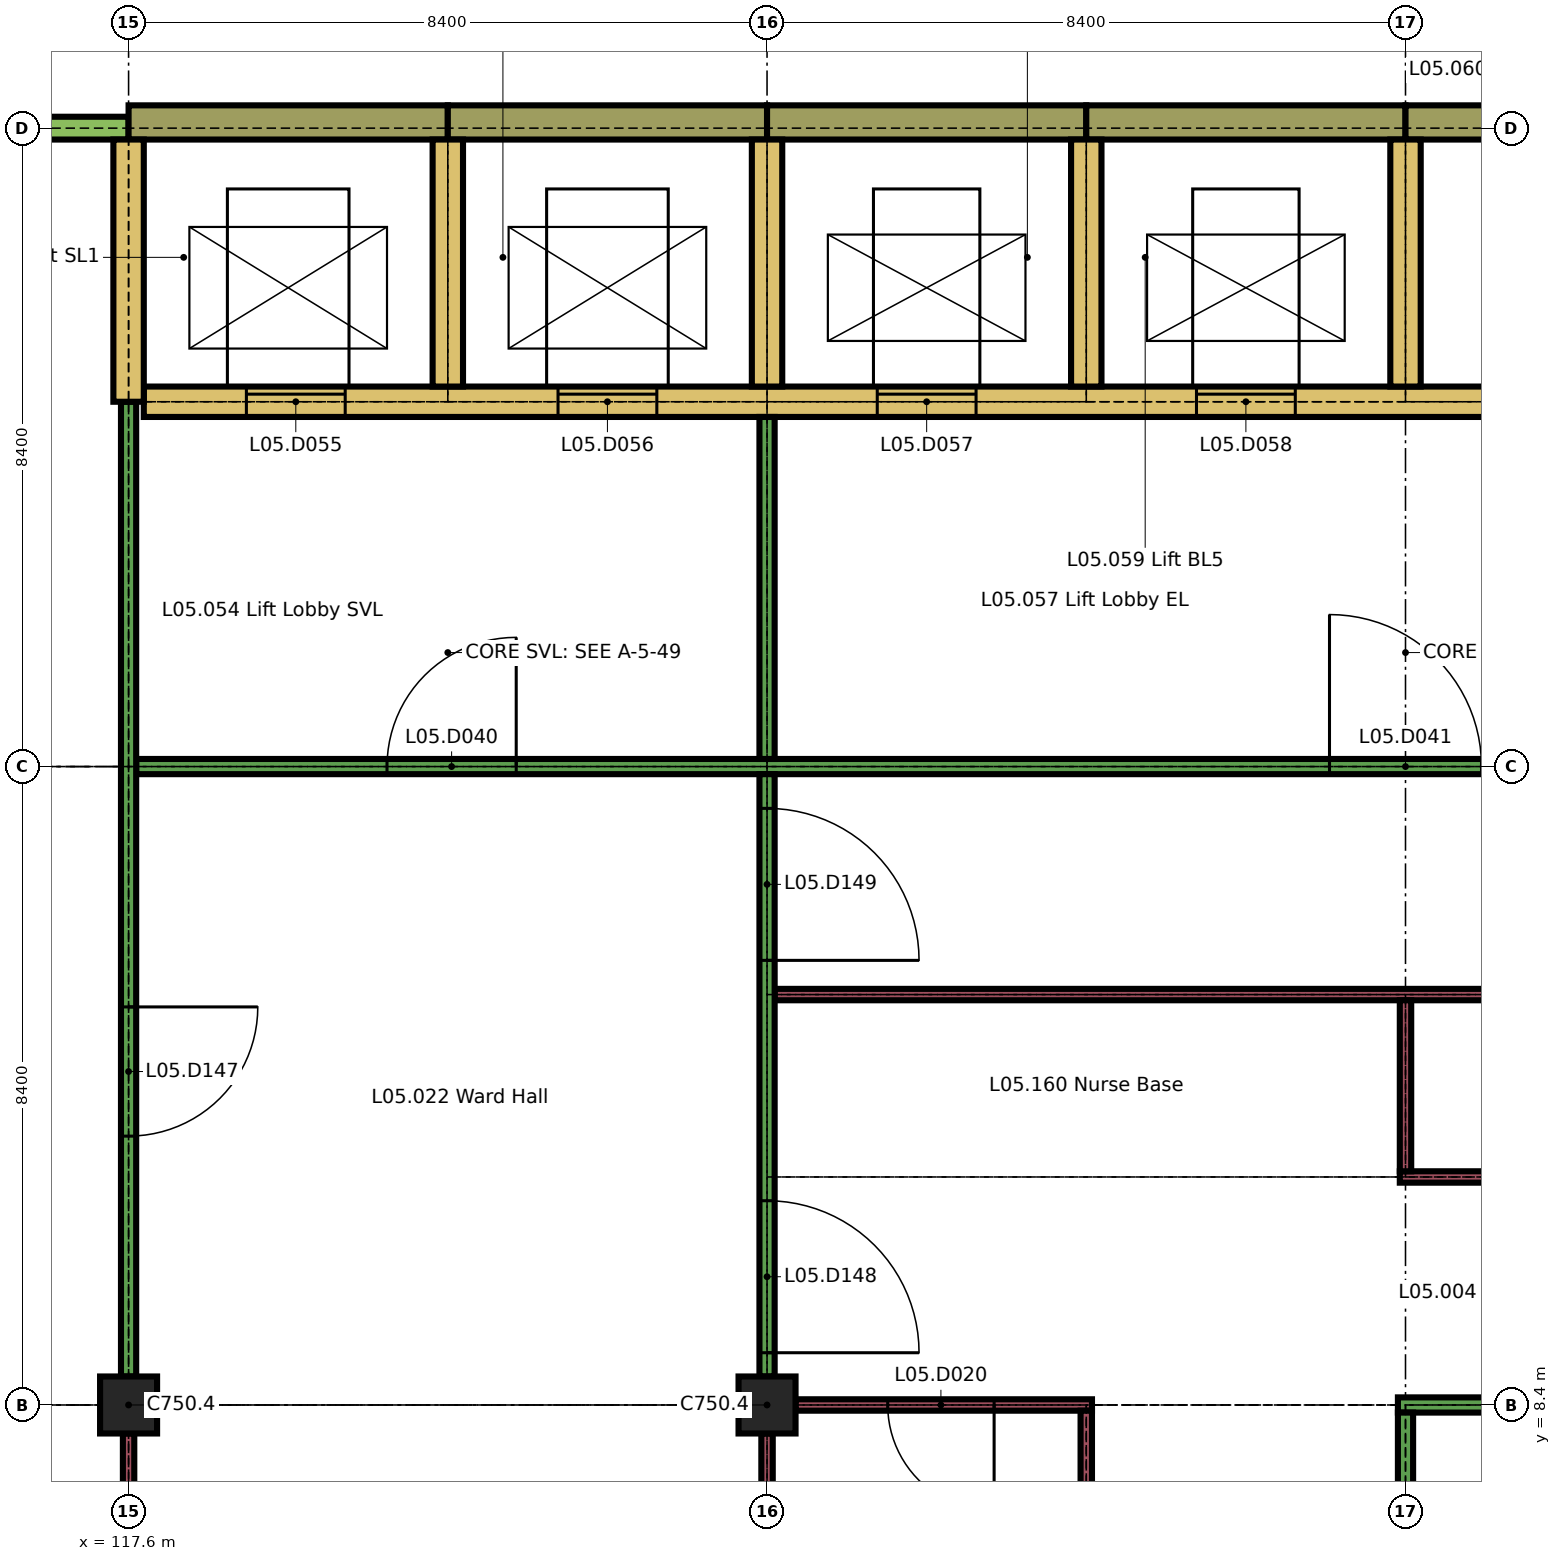
"""IFC4 building model, lengths in metres.
Left out: names, types, materials, properties, quantities, classifications, styles, units other than length and angle.
Written with IfcOpenShell. Run it as: python <this file> out.ifc"""

import sys

from ifc_helpers import new_model, si_unit, direction, frame, frame_2d, origin, origin_2d, place, context, subcontext, project, spatial, rectangle, extrude, element, fill, save


model = new_model("IFC4")
c1 = context("Model", 3, precision=1e-05, world=origin(), true_north=direction((0.0, 1.0)))
c2 = subcontext(c1, "Body", "Model", "MODEL_VIEW")
j1 = project(units=[si_unit("LENGTHUNIT", "METRE"), si_unit("PLANEANGLEUNIT", "RADIAN")], contexts=[c1])
p1 = place(None, origin())
s1 = spatial("IfcSite", under=j1, at=p1, CompositionType="ELEMENT")
p2 = place(p1, origin())
s2 = spatial("IfcBuilding", under=s1, at=p2, CompositionType="ELEMENT")
p3 = place(p2, frame((0.0, 0.0, 22.5)))
s3 = spatial("IfcBuildingStorey", under=s2, at=p3, CompositionType="ELEMENT", Elevation=22.5)
for number, where, z_axis, x_axis in (
    (1, (117.6, 8.4, 0.0), (0.0, 0.0, 1.0), (1.0, 0.0, 0.0)),
    (2, (126.0, 8.4, 0.0), (0.0, 0.0, 1.0), (1.0, 0.0, 0.0)),
):
    element("IfcColumn", number, at=place(p3, frame(where, z_axis=z_axis, x_axis=x_axis)), inside=s3, PredefinedType="COLUMN", context=c2, shape_type="SweptSolid", body=[
        extrude(rectangle(XDim=0.75, YDim=0.75, at=origin_2d()), origin(), (0.0, 0.0, 1.0), 3.26),
    ])
p4 = place(p3, frame((116.3, 25.2, 0.0), z_axis=(0.0, 0.0, 1.0), x_axis=(1.0, 0.0, 0.0)))
e3 = element("IfcWall", 3, at=p4, inside=s3, PredefinedType="SOLIDWALL", context=c2, shape_type="SweptSolid", body=[
    extrude(rectangle(XDim=1.3, YDim=0.3, at=frame_2d((0.65, 0.0))), origin(), (0.0, 0.0, 1.0), 2.96),
])
for number, where, z_axis, x_axis in (
    (4, (117.6, 25.275, 0.0), (0.0, 0.0, 1.0), (1.0, 0.0, 0.0)),
    (5, (121.8, 25.275, 0.0), (0.0, 0.0, 1.0), (1.0, 0.0, 0.0)),
    (6, (126.0, 25.275, 0.0), (0.0, 0.0, 1.0), (1.0, 0.0, 0.0)),
    (7, (130.2, 25.275, 0.0), (0.0, 0.0, 1.0), (1.0, 0.0, 0.0)),
):
    element("IfcWall", number, at=place(p3, frame(where, z_axis=z_axis, x_axis=x_axis)), inside=s3, PredefinedType="SOLIDWALL", context=c2, shape_type="SweptSolid", body=[
        extrude(rectangle(XDim=4.2, YDim=0.45, at=frame_2d((2.1, 0.0))), origin(), (0.0, 0.0, 1.0), 3.26),
    ])
p5 = place(p3, frame((134.4, 25.275, 0.0), z_axis=(0.0, 0.0, 1.0), x_axis=(1.0, 0.0, 0.0)))
e8 = element("IfcWall", 8, at=p5, inside=s3, PredefinedType="SOLIDWALL", context=c2, shape_type="SweptSolid", body=[
    extrude(rectangle(XDim=4.2, YDim=0.45, at=frame_2d((2.1, 0.0))), origin(), (0.0, 0.0, 1.0), 3.26),
])
p6 = place(p3, frame((126.375, 8.4, 0.0), z_axis=(0.0, 0.0, 1.0), x_axis=(1.0, 0.0, 0.0)))
e9 = element("IfcWall", 9, at=p6, inside=s3, PredefinedType="PARTITIONING", context=c2, shape_type="SweptSolid", body=[
    extrude(rectangle(XDim=3.9, YDim=0.15, at=frame_2d((1.95, 0.0))), origin(), (0.0, 0.0, 1.0), 3.26),
])
p7 = place(p6, frame((1.212, 0.0, 0.0)))
e10 = element("IfcOpeningElement", 10, at=p7, cuts=e9, PredefinedType="OPENING", context=c2, shape_type="SweptSolid", body=[
    extrude(rectangle(XDim=1.4, YDim=2.1, at=frame_2d((0.7, 1.05))), frame((0.0, 0.085, 0.0), z_axis=(0.0, -1.0, 0.0), x_axis=(1.0, 0.0, 0.0)), (0.0, 0.0, 1.0), 0.17),
])
p8 = place(p3, frame((134.3, 8.4, 0.0), z_axis=(0.0, 0.0, 1.0), x_axis=(1.0, 0.0, 0.0)))
e11 = element("IfcWall", 11, at=p8, inside=s3, PredefinedType="PARTITIONING", context=c2, shape_type="SweptSolid", body=[
    extrude(rectangle(XDim=8.5, YDim=0.2, at=frame_2d((4.25, 0.0))), origin(), (0.0, 0.0, 1.0), 3.26),
])
p9 = place(p8, frame((3.3, 0.0, 0.0)))
e12 = element("IfcOpeningElement", 12, at=p9, cuts=e11, PredefinedType="OPENING", context=c2, shape_type="SweptSolid", body=[
    extrude(rectangle(XDim=2.0, YDim=2.4, at=frame_2d((1.0, 1.2))), frame((0.0, 0.11, 0.0), z_axis=(0.0, -1.0, 0.0), x_axis=(1.0, 0.0, 0.0)), (0.0, 0.0, 1.0), 0.22),
])
p10 = place(p3, frame((134.325, 11.4, 0.0), z_axis=(0.0, 0.0, 1.0), x_axis=(1.0, 0.0, 0.0)))
e13 = element("IfcWall", 13, at=p10, inside=s3, PredefinedType="PARTITIONING", context=c2, shape_type="SweptSolid", body=[
    extrude(rectangle(XDim=18.35, YDim=0.15, at=frame_2d((9.175, 0.0))), origin(), (0.0, 0.0, 1.0), 3.26),
])
p11 = place(p10, frame((5.775, 0.0, 0.0)))
e14 = element("IfcOpeningElement", 14, at=p11, cuts=e13, PredefinedType="OPENING", context=c2, shape_type="SweptSolid", body=[
    extrude(rectangle(XDim=1.2, YDim=2.1, at=frame_2d((0.6, 1.05))), frame((0.0, 0.085, 0.0), z_axis=(0.0, -1.0, 0.0), x_axis=(1.0, 0.0, 0.0)), (0.0, 0.0, 1.0), 0.17),
])
p12 = place(p10, frame((10.025, 0.0, 0.0)))
e15 = element("IfcOpeningElement", 15, at=p12, cuts=e13, PredefinedType="OPENING", context=c2, shape_type="SweptSolid", body=[
    extrude(rectangle(XDim=1.1, YDim=2.1, at=frame_2d((0.55, 1.05))), frame((0.0, 0.085, 0.0), z_axis=(0.0, -1.0, 0.0), x_axis=(1.0, 0.0, 0.0)), (0.0, 0.0, 1.0), 0.17),
])
p13 = place(p10, frame((13.625, 0.0, 0.0)))
e16 = element("IfcOpeningElement", 16, at=p13, cuts=e13, PredefinedType="OPENING", context=c2, shape_type="SweptSolid", body=[
    extrude(rectangle(XDim=0.9, YDim=2.1, at=frame_2d((0.45, 1.05))), frame((0.0, 0.085, 0.0), z_axis=(0.0, -1.0, 0.0), x_axis=(1.0, 0.0, 0.0)), (0.0, 0.0, 1.0), 0.17),
])
p14 = place(p3, frame((126.1, 13.8, 0.0), z_axis=(0.0, 0.0, 1.0), x_axis=(1.0, 0.0, 0.0)))
e17 = element("IfcWall", 17, at=p14, inside=s3, PredefinedType="PARTITIONING", context=c2, shape_type="SweptSolid", body=[
    extrude(rectangle(XDim=30.575, YDim=0.15, at=frame_2d((15.288, 0.0))), origin(), (0.0, 0.0, 1.0), 3.26),
])
p15 = place(p14, frame((9.85, 0.0, 0.0)))
e18 = element("IfcOpeningElement", 18, at=p15, cuts=e17, PredefinedType="OPENING", context=c2, shape_type="SweptSolid", body=[
    extrude(rectangle(XDim=1.1, YDim=2.1, at=frame_2d((0.55, 1.05))), frame((0.0, 0.085, 0.0), z_axis=(0.0, -1.0, 0.0), x_axis=(1.0, 0.0, 0.0)), (0.0, 0.0, 1.0), 0.17),
])
p16 = place(p14, frame((24.65, 0.0, 0.0)))
e19 = element("IfcOpeningElement", 19, at=p16, cuts=e17, PredefinedType="OPENING", context=c2, shape_type="SweptSolid", body=[
    extrude(rectangle(XDim=0.9, YDim=2.1, at=frame_2d((0.45, 1.05))), frame((0.0, 0.085, 0.0), z_axis=(0.0, -1.0, 0.0), x_axis=(1.0, 0.0, 0.0)), (0.0, 0.0, 1.0), 0.17),
])
p17 = place(p3, frame((117.7, 16.8, 0.0), z_axis=(0.0, 0.0, 1.0), x_axis=(1.0, 0.0, 0.0)))
e20 = element("IfcWall", 20, at=p17, inside=s3, PredefinedType="PARTITIONING", context=c2, shape_type="SweptSolid", body=[
    extrude(rectangle(XDim=25.1, YDim=0.2, at=frame_2d((12.55, 0.0))), origin(), (0.0, 0.0, 1.0), 3.26),
])
p18 = place(p17, frame((3.3, 0.0, 0.0)))
e21 = element("IfcOpeningElement", 21, at=p18, cuts=e20, PredefinedType="OPENING", context=c2, shape_type="SweptSolid", body=[
    extrude(rectangle(XDim=1.7, YDim=2.4, at=frame_2d((0.85, 1.2))), frame((0.0, 0.11, 0.0), z_axis=(0.0, -1.0, 0.0), x_axis=(1.0, 0.0, 0.0)), (0.0, 0.0, 1.0), 0.22),
])
p19 = place(p17, frame((15.7, 0.0, 0.0)))
e22 = element("IfcOpeningElement", 22, at=p19, cuts=e20, PredefinedType="OPENING", context=c2, shape_type="SweptSolid", body=[
    extrude(rectangle(XDim=2.0, YDim=2.4, at=frame_2d((1.0, 1.2))), frame((0.0, 0.11, 0.0), z_axis=(0.0, -1.0, 0.0), x_axis=(1.0, 0.0, 0.0)), (0.0, 0.0, 1.0), 0.22),
])
p20 = place(p3, frame((117.8, 21.6, 0.0), z_axis=(0.0, 0.0, 1.0), x_axis=(1.0, 0.0, 0.0)))
e23 = element("IfcWall", 23, at=p20, inside=s3, PredefinedType="SHEAR", context=c2, shape_type="SweptSolid", body=[
    extrude(rectangle(XDim=24.8, YDim=0.4, at=frame_2d((12.4, 0.0))), origin(), (0.0, 0.0, 1.0), 3.26),
])
p21 = place(p20, frame((1.35, 0.0, 0.0)))
e24 = element("IfcOpeningElement", 24, at=p21, cuts=e23, PredefinedType="OPENING", context=c2, shape_type="SweptSolid", body=[
    extrude(rectangle(XDim=1.3, YDim=2.1, at=frame_2d((0.65, 1.05))), frame((0.0, 0.21, 0.0), z_axis=(0.0, -1.0, 0.0), x_axis=(1.0, 0.0, 0.0)), (0.0, 0.0, 1.0), 0.42),
])
p22 = place(p20, frame((5.45, 0.0, 0.0)))
e25 = element("IfcOpeningElement", 25, at=p22, cuts=e23, PredefinedType="OPENING", context=c2, shape_type="SweptSolid", body=[
    extrude(rectangle(XDim=1.3, YDim=2.1, at=frame_2d((0.65, 1.05))), frame((0.0, 0.21, 0.0), z_axis=(0.0, -1.0, 0.0), x_axis=(1.0, 0.0, 0.0)), (0.0, 0.0, 1.0), 0.42),
])
p23 = place(p20, frame((9.65, 0.0, 0.0)))
e26 = element("IfcOpeningElement", 26, at=p23, cuts=e23, PredefinedType="OPENING", context=c2, shape_type="SweptSolid", body=[
    extrude(rectangle(XDim=1.3, YDim=2.1, at=frame_2d((0.65, 1.05))), frame((0.0, 0.21, 0.0), z_axis=(0.0, -1.0, 0.0), x_axis=(1.0, 0.0, 0.0)), (0.0, 0.0, 1.0), 0.42),
])
p24 = place(p20, frame((13.85, 0.0, 0.0)))
e27 = element("IfcOpeningElement", 27, at=p24, cuts=e23, PredefinedType="OPENING", context=c2, shape_type="SweptSolid", body=[
    extrude(rectangle(XDim=1.3, YDim=2.1, at=frame_2d((0.65, 1.05))), frame((0.0, 0.21, 0.0), z_axis=(0.0, -1.0, 0.0), x_axis=(1.0, 0.0, 0.0)), (0.0, 0.0, 1.0), 0.42),
])
p25 = place(p20, frame((18.15, 0.0, 0.0)))
e28 = element("IfcOpeningElement", 28, at=p25, cuts=e23, PredefinedType="OPENING", context=c2, shape_type="SweptSolid", body=[
    extrude(rectangle(XDim=1.1, YDim=2.1, at=frame_2d((0.55, 1.05))), frame((0.0, 0.21, 0.0), z_axis=(0.0, -1.0, 0.0), x_axis=(1.0, 0.0, 0.0)), (0.0, 0.0, 1.0), 0.42),
])
p26 = place(p20, frame((22.25, 0.0, 0.0)))
e29 = element("IfcOpeningElement", 29, at=p26, cuts=e23, PredefinedType="OPENING", context=c2, shape_type="SweptSolid", body=[
    extrude(rectangle(XDim=1.1, YDim=2.1, at=frame_2d((0.55, 1.05))), frame((0.0, 0.21, 0.0), z_axis=(0.0, -1.0, 0.0), x_axis=(1.0, 0.0, 0.0)), (0.0, 0.0, 1.0), 0.42),
])
p27 = place(p3, frame((117.6, 0.375, 0.0), z_axis=(0.0, 0.0, 1.0), x_axis=(0.0, 1.0, 0.0)))
e30 = element("IfcWall", 30, at=p27, inside=s3, PredefinedType="PARTITIONING", context=c2, shape_type="SweptSolid", body=[
    extrude(rectangle(XDim=7.65, YDim=0.15, at=frame_2d((3.825, 0.0))), origin(), (0.0, 0.0, 1.0), 3.26),
])
p28 = place(p3, frame((117.6, 8.775, 0.0), z_axis=(0.0, 0.0, 1.0), x_axis=(0.0, 1.0, 0.0)))
e31 = element("IfcWall", 31, at=p28, inside=s3, PredefinedType="PARTITIONING", context=c2, shape_type="SweptSolid", body=[
    extrude(rectangle(XDim=12.825, YDim=0.2, at=frame_2d((6.413, 0.0))), origin(), (0.0, 0.0, 1.0), 3.26),
])
p29 = place(p28, frame((3.163, 0.0, 0.0)))
e32 = element("IfcOpeningElement", 32, at=p29, cuts=e31, PredefinedType="OPENING", context=c2, shape_type="SweptSolid", body=[
    extrude(rectangle(XDim=1.7, YDim=2.4, at=frame_2d((0.85, 1.2))), frame((0.0, 0.11, 0.0), z_axis=(0.0, -1.0, 0.0), x_axis=(1.0, 0.0, 0.0)), (0.0, 0.0, 1.0), 0.22),
])
p30 = place(p3, frame((117.6, 21.6, 0.0), z_axis=(0.0, 0.0, 1.0), x_axis=(0.0, 1.0, 0.0)))
e33 = element("IfcWall", 33, at=p30, inside=s3, PredefinedType="SHEAR", context=c2, shape_type="SweptSolid", body=[
    extrude(rectangle(XDim=3.45, YDim=0.4, at=frame_2d((1.725, 0.0))), origin(), (0.0, 0.0, 1.0), 3.26),
])
p31 = place(p3, frame((121.8, 21.8, 0.0), z_axis=(0.0, 0.0, 1.0), x_axis=(0.0, 1.0, 0.0)))
e34 = element("IfcWall", 34, at=p31, inside=s3, PredefinedType="SHEAR", context=c2, shape_type="SweptSolid", body=[
    extrude(rectangle(XDim=3.25, YDim=0.4, at=frame_2d((1.625, 0.0))), origin(), (0.0, 0.0, 1.0), 3.26),
])
p32 = place(p3, frame((126.0, 0.375, 0.0), z_axis=(0.0, 0.0, 1.0), x_axis=(0.0, 1.0, 0.0)))
e35 = element("IfcWall", 35, at=p32, inside=s3, PredefinedType="PARTITIONING", context=c2, shape_type="SweptSolid", body=[
    extrude(rectangle(XDim=7.65, YDim=0.15, at=frame_2d((3.825, 0.0))), origin(), (0.0, 0.0, 1.0), 3.26),
])
p33 = place(p3, frame((126.0, 8.775, 0.0), z_axis=(0.0, 0.0, 1.0), x_axis=(0.0, 1.0, 0.0)))
e36 = element("IfcWall", 36, at=p33, inside=s3, PredefinedType="PARTITIONING", context=c2, shape_type="SweptSolid", body=[
    extrude(rectangle(XDim=7.925, YDim=0.2, at=frame_2d((3.962, 0.0))), origin(), (0.0, 0.0, 1.0), 3.26),
])
p34 = place(p33, frame((0.312, 0.0, 0.0)))
e37 = element("IfcOpeningElement", 37, at=p34, cuts=e36, PredefinedType="OPENING", context=c2, shape_type="SweptSolid", body=[
    extrude(rectangle(XDim=2.0, YDim=2.4, at=frame_2d((1.0, 1.2))), frame((0.0, 0.11, 0.0), z_axis=(0.0, -1.0, 0.0), x_axis=(1.0, 0.0, 0.0)), (0.0, 0.0, 1.0), 0.22),
])
p35 = place(p33, frame((5.475, 0.0, 0.0)))
e38 = element("IfcOpeningElement", 38, at=p35, cuts=e36, PredefinedType="OPENING", context=c2, shape_type="SweptSolid", body=[
    extrude(rectangle(XDim=2.0, YDim=2.4, at=frame_2d((1.0, 1.2))), frame((0.0, 0.11, 0.0), z_axis=(0.0, -1.0, 0.0), x_axis=(1.0, 0.0, 0.0)), (0.0, 0.0, 1.0), 0.22),
])
p36 = place(p3, frame((126.0, 16.9, 0.0), z_axis=(0.0, 0.0, 1.0), x_axis=(0.0, 1.0, 0.0)))
e39 = element("IfcWall", 39, at=p36, inside=s3, PredefinedType="PARTITIONING", context=c2, shape_type="SweptSolid", body=[
    extrude(rectangle(XDim=4.5, YDim=0.2, at=frame_2d((2.25, 0.0))), origin(), (0.0, 0.0, 1.0), 3.26),
])
p37 = place(p3, frame((126.0, 21.8, 0.0), z_axis=(0.0, 0.0, 1.0), x_axis=(0.0, 1.0, 0.0)))
e40 = element("IfcWall", 40, at=p37, inside=s3, PredefinedType="SHEAR", context=c2, shape_type="SweptSolid", body=[
    extrude(rectangle(XDim=3.25, YDim=0.4, at=frame_2d((1.625, 0.0))), origin(), (0.0, 0.0, 1.0), 3.26),
])
p38 = place(p3, frame((130.2, 0.15, 0.0), z_axis=(0.0, 0.0, 1.0), x_axis=(0.0, 1.0, 0.0)))
e41 = element("IfcWall", 41, at=p38, inside=s3, PredefinedType="PARTITIONING", context=c2, shape_type="SweptSolid", body=[
    extrude(rectangle(XDim=8.175, YDim=0.15, at=frame_2d((4.087, 0.0))), origin(), (0.0, 0.0, 1.0), 3.26),
])
p39 = place(p3, frame((130.2, 21.8, 0.0), z_axis=(0.0, 0.0, 1.0), x_axis=(0.0, 1.0, 0.0)))
e42 = element("IfcWall", 42, at=p39, inside=s3, PredefinedType="SHEAR", context=c2, shape_type="SweptSolid", body=[
    extrude(rectangle(XDim=3.25, YDim=0.4, at=frame_2d((1.625, 0.0))), origin(), (0.0, 0.0, 1.0), 3.26),
])
p40 = place(p3, frame((134.4, 3.6, 0.0), z_axis=(0.0, 0.0, 1.0), x_axis=(0.0, 1.0, 0.0)))
e43 = element("IfcWall", 43, at=p40, inside=s3, PredefinedType="PARTITIONING", context=c2, shape_type="SweptSolid", body=[
    extrude(rectangle(XDim=4.7, YDim=0.2, at=frame_2d((2.35, 0.0))), origin(), (0.0, 0.0, 1.0), 3.26),
])
p41 = place(p3, frame((134.4, 11.475, 0.0), z_axis=(0.0, 0.0, 1.0), x_axis=(0.0, 1.0, 0.0)))
e44 = element("IfcWall", 44, at=p41, inside=s3, PredefinedType="PARTITIONING", context=c2, shape_type="SweptSolid", body=[
    extrude(rectangle(XDim=2.25, YDim=0.15, at=frame_2d((1.125, 0.0))), origin(), (0.0, 0.0, 1.0), 3.26),
])
p42 = place(p3, frame((134.4, 21.8, 0.0), z_axis=(0.0, 0.0, 1.0), x_axis=(0.0, 1.0, 0.0)))
e45 = element("IfcWall", 45, at=p42, inside=s3, PredefinedType="SHEAR", context=c2, shape_type="SweptSolid", body=[
    extrude(rectangle(XDim=3.25, YDim=0.4, at=frame_2d((1.625, 0.0))), origin(), (0.0, 0.0, 1.0), 3.26),
])
p43 = place(p7, origin())
e46 = element("IfcDoor", 46, at=p43, inside=s3, OperationType="SINGLE_SWING_RIGHT", PredefinedType="DOOR", context=c2, shape_type="SweptSolid", body=[
    extrude(rectangle(XDim=1.4, YDim=2.1, at=frame_2d((0.7, 1.05))), frame((0.0, 0.025, 0.0), z_axis=(0.0, -1.0, 0.0), x_axis=(1.0, 0.0, 0.0)), (0.0, 0.0, 1.0), 0.05),
])
fill(e10, e46)
p44 = place(p18, origin())
e47 = element("IfcDoor", 47, at=p44, inside=s3, OperationType="SINGLE_SWING_LEFT", PredefinedType="DOOR", context=c2, shape_type="SweptSolid", body=[
    extrude(rectangle(XDim=1.7, YDim=2.4, at=frame_2d((0.85, 1.2))), frame((0.0, 0.025, 0.0), z_axis=(0.0, -1.0, 0.0), x_axis=(1.0, 0.0, 0.0)), (0.0, 0.0, 1.0), 0.05),
])
fill(e21, e47)
p45 = place(p19, origin())
e48 = element("IfcDoor", 48, at=p45, inside=s3, OperationType="SINGLE_SWING_RIGHT", PredefinedType="DOOR", context=c2, shape_type="SweptSolid", body=[
    extrude(rectangle(XDim=2.0, YDim=2.4, at=frame_2d((1.0, 1.2))), frame((0.0, 0.03, 0.0), z_axis=(0.0, -1.0, 0.0), x_axis=(1.0, 0.0, 0.0)), (0.0, 0.0, 1.0), 0.06),
])
fill(e22, e48)
p46 = place(p21, origin())
e49 = element("IfcDoor", 49, at=p46, inside=s3, OperationType="SLIDING_TO_LEFT", PredefinedType="DOOR", context=c2, shape_type="SweptSolid", body=[
    extrude(rectangle(XDim=1.3, YDim=2.1, at=frame_2d((0.65, 1.05))), frame((0.0, 0.025, 0.0), z_axis=(0.0, -1.0, 0.0), x_axis=(1.0, 0.0, 0.0)), (0.0, 0.0, 1.0), 0.05),
])
fill(e24, e49)
p47 = place(p22, origin())
e50 = element("IfcDoor", 50, at=p47, inside=s3, OperationType="SLIDING_TO_LEFT", PredefinedType="DOOR", context=c2, shape_type="SweptSolid", body=[
    extrude(rectangle(XDim=1.3, YDim=2.1, at=frame_2d((0.65, 1.05))), frame((0.0, 0.025, 0.0), z_axis=(0.0, -1.0, 0.0), x_axis=(1.0, 0.0, 0.0)), (0.0, 0.0, 1.0), 0.05),
])
fill(e25, e50)
p48 = place(p23, origin())
e51 = element("IfcDoor", 51, at=p48, inside=s3, OperationType="SLIDING_TO_LEFT", PredefinedType="DOOR", context=c2, shape_type="SweptSolid", body=[
    extrude(rectangle(XDim=1.3, YDim=2.1, at=frame_2d((0.65, 1.05))), frame((0.0, 0.025, 0.0), z_axis=(0.0, -1.0, 0.0), x_axis=(1.0, 0.0, 0.0)), (0.0, 0.0, 1.0), 0.05),
])
fill(e26, e51)
p49 = place(p24, origin())
e52 = element("IfcDoor", 52, at=p49, inside=s3, OperationType="SLIDING_TO_LEFT", PredefinedType="DOOR", context=c2, shape_type="SweptSolid", body=[
    extrude(rectangle(XDim=1.3, YDim=2.1, at=frame_2d((0.65, 1.05))), frame((0.0, 0.025, 0.0), z_axis=(0.0, -1.0, 0.0), x_axis=(1.0, 0.0, 0.0)), (0.0, 0.0, 1.0), 0.05),
])
fill(e27, e52)
p50 = place(p29, origin())
e53 = element("IfcDoor", 53, at=p50, inside=s3, OperationType="SINGLE_SWING_RIGHT", PredefinedType="DOOR", context=c2, shape_type="SweptSolid", body=[
    extrude(rectangle(XDim=1.7, YDim=2.4, at=frame_2d((0.85, 1.2))), frame((0.0, 0.025, 0.0), z_axis=(0.0, -1.0, 0.0), x_axis=(1.0, 0.0, 0.0)), (0.0, 0.0, 1.0), 0.05),
])
fill(e32, e53)
p51 = place(p34, origin())
e54 = element("IfcDoor", 54, at=p51, inside=s3, OperationType="SINGLE_SWING_LEFT", PredefinedType="DOOR", context=c2, shape_type="SweptSolid", body=[
    extrude(rectangle(XDim=2.0, YDim=2.4, at=frame_2d((1.0, 1.2))), frame((0.0, 0.03, 0.0), z_axis=(0.0, -1.0, 0.0), x_axis=(1.0, 0.0, 0.0)), (0.0, 0.0, 1.0), 0.06),
])
fill(e37, e54)
p52 = place(p35, origin())
e55 = element("IfcDoor", 55, at=p52, inside=s3, OperationType="SINGLE_SWING_LEFT", PredefinedType="DOOR", context=c2, shape_type="SweptSolid", body=[
    extrude(rectangle(XDim=2.0, YDim=2.4, at=frame_2d((1.0, 1.2))), frame((0.0, 0.03, 0.0), z_axis=(0.0, -1.0, 0.0), x_axis=(1.0, 0.0, 0.0)), (0.0, 0.0, 1.0), 0.06),
])
fill(e38, e55)
save(model, sys.argv[1])
